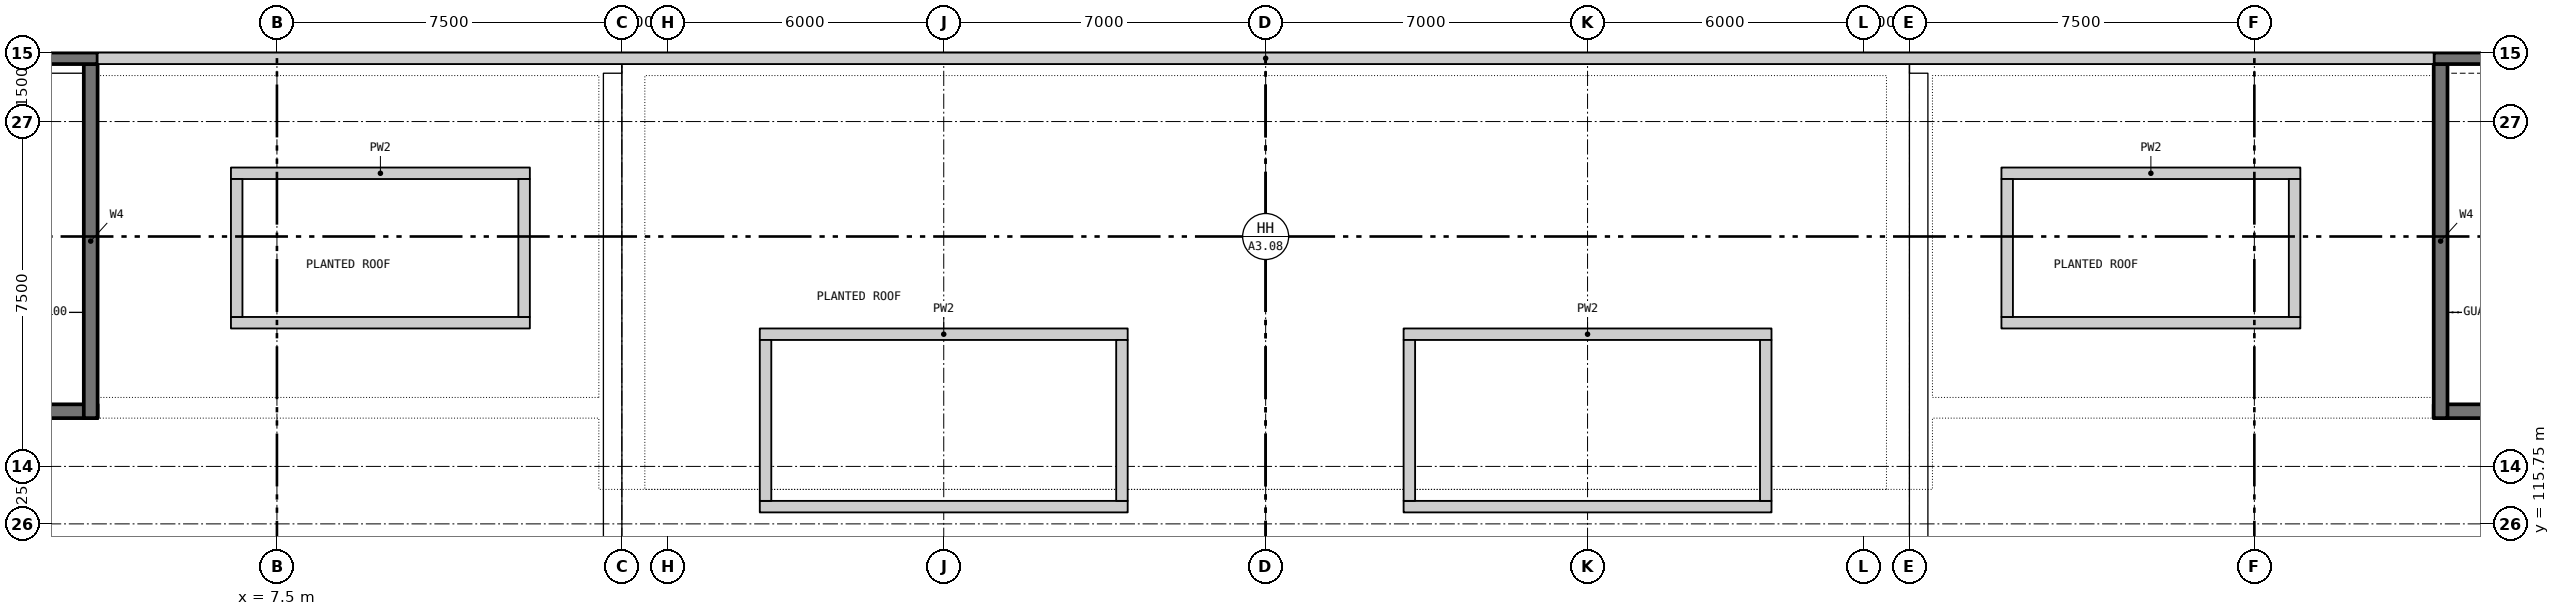
"""IFC4 building model, lengths in metres.
Left out: names, types, materials, properties, quantities, classifications, styles, units other than length and angle.
Written with IfcOpenShell. Run it as: python <this file> out.ifc"""

import sys

from ifc_helpers import new_model, si_unit, direction, frame, frame_2d, origin, place, context, subcontext, project, spatial, rectangle, extrude, element, save


model = new_model("IFC4")
c1 = context("Model", 3, precision=1e-05, world=origin(), true_north=direction((0.0, 1.0)))
c2 = subcontext(c1, "Body", "Model", "MODEL_VIEW")
j1 = project(units=[si_unit("LENGTHUNIT", "METRE"), si_unit("PLANEANGLEUNIT", "RADIAN")], contexts=[c1])
p1 = place(None, origin())
s1 = spatial("IfcSite", under=j1, at=p1, CompositionType="ELEMENT")
p2 = place(p1, origin())
s2 = spatial("IfcBuilding", under=s1, at=p2, CompositionType="ELEMENT")
p3 = place(p2, frame((0.0, 0.0, 10.2)))
s3 = spatial("IfcBuildingStorey", under=s2, at=p3, CompositionType="ELEMENT", Elevation=10.2)
p4 = place(p3, frame((3.6, 125.875, 0.0), z_axis=(0.0, 0.0, 1.0), x_axis=(1.0, 0.0, 0.0)))
e1 = element("IfcWall", 1, at=p4, inside=s3, PredefinedType="PARAPET", context=c2, shape_type="SweptSolid", body=[
    extrude(rectangle(XDim=50.8, YDim=0.25, at=frame_2d((25.4, 0.0))), origin(), (0.0, 0.0, 1.0), 1.1),
])
p5 = place(p3, frame((0.3, 118.2, 0.0), z_axis=(0.0, 0.0, 1.0), x_axis=(1.0, 0.0, 0.0)))
e2 = element("IfcWall", 2, at=p5, inside=s3, PredefinedType="SHEAR", context=c2, shape_type="SweptSolid", body=[
    extrude(rectangle(XDim=3.3, YDim=0.3, at=frame_2d((1.65, 0.0))), origin(), (0.0, 0.0, 1.0), 2.6),
])
p6 = place(p5, frame((0.95, 0.0, 0.0)))
e3 = element("IfcOpeningElement", 3, at=p6, cuts=e2, PredefinedType="OPENING", context=c2, shape_type="SweptSolid", body=[
    extrude(rectangle(XDim=1.1, YDim=2.1, at=frame_2d((0.55, 1.05))), frame((0.0, 0.16, 0.0), z_axis=(0.0, -1.0, 0.0), x_axis=(1.0, 0.0, 0.0)), (0.0, 0.0, 1.0), 0.32),
])
p7 = place(p3, frame((3.45, 118.05, 0.0), z_axis=(0.0, 0.0, 1.0), x_axis=(0.0, 1.0, 0.0)))
e4 = element("IfcWall", 4, at=p7, inside=s3, PredefinedType="SHEAR", context=c2, shape_type="SweptSolid", body=[
    extrude(rectangle(XDim=7.7, YDim=0.3, at=frame_2d((3.85, 0.0))), origin(), (0.0, 0.0, 1.0), 2.6),
])
p8 = place(p3, frame((0.0, 125.875, 0.0), z_axis=(0.0, 0.0, 1.0), x_axis=(1.0, 0.0, 0.0)))
e5 = element("IfcWall", 5, at=p8, inside=s3, PredefinedType="SOLIDWALL", context=c2, shape_type="SweptSolid", body=[
    extrude(rectangle(XDim=3.6, YDim=0.25, at=frame_2d((1.8, 0.0))), origin(), (0.0, 0.0, 1.0), 2.6),
])
p9 = place(p3, frame((54.4, 118.2, 0.0), z_axis=(0.0, 0.0, 1.0), x_axis=(1.0, 0.0, 0.0)))
e6 = element("IfcWall", 6, at=p9, inside=s3, PredefinedType="SHEAR", context=c2, shape_type="SweptSolid", body=[
    extrude(rectangle(XDim=3.35, YDim=0.3, at=frame_2d((1.675, 0.0))), origin(), (0.0, 0.0, 1.0), 2.6),
])
p10 = place(p9, frame((1.25, 0.0, 0.0)))
e7 = element("IfcOpeningElement", 7, at=p10, cuts=e6, PredefinedType="OPENING", context=c2, shape_type="SweptSolid", body=[
    extrude(rectangle(XDim=1.1, YDim=2.1, at=frame_2d((0.55, 1.05))), frame((0.0, 0.16, 0.0), z_axis=(0.0, -1.0, 0.0), x_axis=(1.0, 0.0, 0.0)), (0.0, 0.0, 1.0), 0.32),
])
p11 = place(p3, frame((54.55, 118.05, 0.0), z_axis=(0.0, 0.0, 1.0), x_axis=(0.0, 1.0, 0.0)))
e8 = element("IfcWall", 8, at=p11, inside=s3, PredefinedType="SHEAR", context=c2, shape_type="SweptSolid", body=[
    extrude(rectangle(XDim=7.7, YDim=0.3, at=frame_2d((3.85, 0.0))), origin(), (0.0, 0.0, 1.0), 2.6),
])
p12 = place(p3, frame((54.4, 125.875, 0.0), z_axis=(0.0, 0.0, 1.0), x_axis=(1.0, 0.0, 0.0)))
e9 = element("IfcWall", 9, at=p12, inside=s3, PredefinedType="SOLIDWALL", context=c2, shape_type="SweptSolid", body=[
    extrude(rectangle(XDim=3.6, YDim=0.25, at=frame_2d((1.8, 0.0))), origin(), (0.0, 0.0, 1.0), 2.6),
])
for number, where, z_axis, x_axis in (
    (10, (18.0, 116.125, 0.0), (0.0, 0.0, 1.0), (1.0, 0.0, 0.0)),
    (11, (18.0, 119.875, 0.0), (0.0, 0.0, 1.0), (1.0, 0.0, 0.0)),
):
    element("IfcWall", number, at=place(p3, frame(where, z_axis=z_axis, x_axis=x_axis)), inside=s3, PredefinedType="SOLIDWALL", context=c2, shape_type="SweptSolid", body=[
        extrude(rectangle(XDim=8.0, YDim=0.25, at=frame_2d((4.0, 0.0))), origin(), (0.0, 0.0, 1.0), 0.6),
    ])
for number, where, z_axis, x_axis in (
    (12, (18.125, 116.25, 0.0), (0.0, 0.0, 1.0), (0.0, 1.0, 0.0)),
    (13, (25.875, 116.25, 0.0), (0.0, 0.0, 1.0), (0.0, 1.0, 0.0)),
):
    element("IfcWall", number, at=place(p3, frame(where, z_axis=z_axis, x_axis=x_axis)), inside=s3, PredefinedType="SOLIDWALL", context=c2, shape_type="SweptSolid", body=[
        extrude(rectangle(XDim=3.5, YDim=0.25, at=frame_2d((1.75, 0.0))), origin(), (0.0, 0.0, 1.0), 0.6),
    ])
for number, where, z_axis, x_axis in (
    (14, (32.0, 116.125, 0.0), (0.0, 0.0, 1.0), (1.0, 0.0, 0.0)),
    (15, (32.0, 119.875, 0.0), (0.0, 0.0, 1.0), (1.0, 0.0, 0.0)),
):
    element("IfcWall", number, at=place(p3, frame(where, z_axis=z_axis, x_axis=x_axis)), inside=s3, PredefinedType="SOLIDWALL", context=c2, shape_type="SweptSolid", body=[
        extrude(rectangle(XDim=8.0, YDim=0.25, at=frame_2d((4.0, 0.0))), origin(), (0.0, 0.0, 1.0), 0.6),
    ])
for number, where, z_axis, x_axis in (
    (16, (32.125, 116.25, 0.0), (0.0, 0.0, 1.0), (0.0, 1.0, 0.0)),
    (17, (39.875, 116.25, 0.0), (0.0, 0.0, 1.0), (0.0, 1.0, 0.0)),
):
    element("IfcWall", number, at=place(p3, frame(where, z_axis=z_axis, x_axis=x_axis)), inside=s3, PredefinedType="SOLIDWALL", context=c2, shape_type="SweptSolid", body=[
        extrude(rectangle(XDim=3.5, YDim=0.25, at=frame_2d((1.75, 0.0))), origin(), (0.0, 0.0, 1.0), 0.6),
    ])
for number, where, z_axis, x_axis in (
    (18, (6.5, 120.125, 0.0), (0.0, 0.0, 1.0), (1.0, 0.0, 0.0)),
    (19, (6.5, 123.375, 0.0), (0.0, 0.0, 1.0), (1.0, 0.0, 0.0)),
):
    element("IfcWall", number, at=place(p3, frame(where, z_axis=z_axis, x_axis=x_axis)), inside=s3, PredefinedType="SOLIDWALL", context=c2, shape_type="SweptSolid", body=[
        extrude(rectangle(XDim=6.5, YDim=0.25, at=frame_2d((3.25, 0.0))), origin(), (0.0, 0.0, 1.0), 0.6),
    ])
for number, where, z_axis, x_axis in (
    (20, (6.625, 120.25, 0.0), (0.0, 0.0, 1.0), (0.0, 1.0, 0.0)),
    (21, (12.875, 120.25, 0.0), (0.0, 0.0, 1.0), (0.0, 1.0, 0.0)),
):
    element("IfcWall", number, at=place(p3, frame(where, z_axis=z_axis, x_axis=x_axis)), inside=s3, PredefinedType="SOLIDWALL", context=c2, shape_type="SweptSolid", body=[
        extrude(rectangle(XDim=3.0, YDim=0.25, at=frame_2d((1.5, 0.0))), origin(), (0.0, 0.0, 1.0), 0.6),
    ])
for number, where, z_axis, x_axis in (
    (22, (45.0, 120.125, 0.0), (0.0, 0.0, 1.0), (1.0, 0.0, 0.0)),
    (23, (45.0, 123.375, 0.0), (0.0, 0.0, 1.0), (1.0, 0.0, 0.0)),
):
    element("IfcWall", number, at=place(p3, frame(where, z_axis=z_axis, x_axis=x_axis)), inside=s3, PredefinedType="SOLIDWALL", context=c2, shape_type="SweptSolid", body=[
        extrude(rectangle(XDim=6.5, YDim=0.25, at=frame_2d((3.25, 0.0))), origin(), (0.0, 0.0, 1.0), 0.6),
    ])
for number, where, z_axis, x_axis in (
    (24, (45.125, 120.25, 0.0), (0.0, 0.0, 1.0), (0.0, 1.0, 0.0)),
    (25, (51.375, 120.25, 0.0), (0.0, 0.0, 1.0), (0.0, 1.0, 0.0)),
):
    element("IfcWall", number, at=place(p3, frame(where, z_axis=z_axis, x_axis=x_axis)), inside=s3, PredefinedType="SOLIDWALL", context=c2, shape_type="SweptSolid", body=[
        extrude(rectangle(XDim=3.0, YDim=0.25, at=frame_2d((1.5, 0.0))), origin(), (0.0, 0.0, 1.0), 0.6),
    ])
save(model, sys.argv[1])
